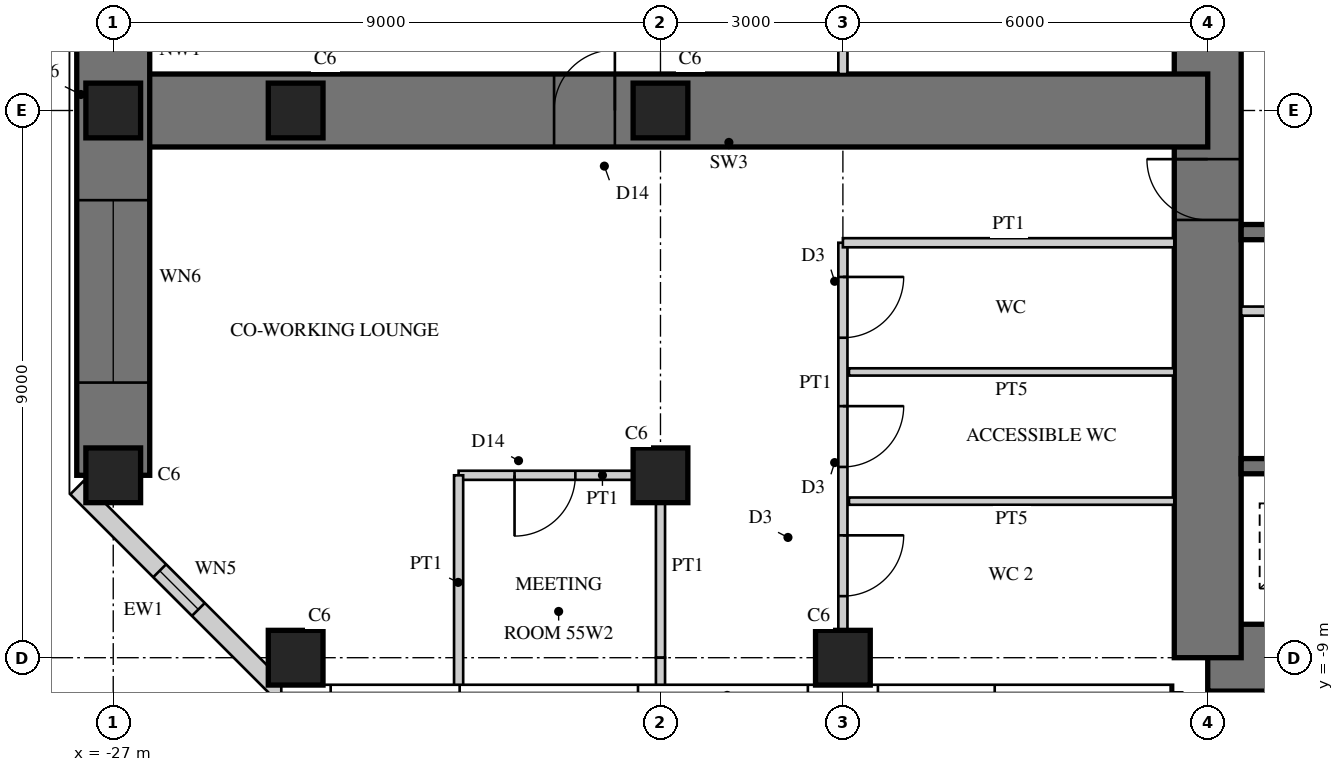
"""IFC4 building model, lengths in metres.
Left out: names, types, materials, properties, quantities, classifications, styles, units other than length and angle.
Written with IfcOpenShell. Run it as: python <this file> out.ifc"""

import sys

from ifc_helpers import new_model, si_unit, direction, frame, frame_2d, origin, origin_2d, place, context, subcontext, project, spatial, rectangle, hollow_rectangle, extrude, element, fill, save


model = new_model("IFC4")
c1 = context("Model", 3, precision=1e-05, world=origin(), true_north=direction((0.0, 1.0)))
c2 = subcontext(c1, "Body", "Model", "MODEL_VIEW")
j1 = project(units=[si_unit("LENGTHUNIT", "METRE"), si_unit("PLANEANGLEUNIT", "RADIAN")], contexts=[c1])
p1 = place(None, origin())
s1 = spatial("IfcSite", under=j1, at=p1, CompositionType="ELEMENT")
p2 = place(p1, origin())
s2 = spatial("IfcBuilding", under=s1, at=p2, CompositionType="ELEMENT")
p3 = place(p2, frame((0.0, 0.0, 217.1)))
s3 = spatial("IfcBuildingStorey", under=s2, at=p3, CompositionType="ELEMENT", Elevation=217.1)
p4 = place(p3, frame((-9.0, -9.0, 0.0), z_axis=(0.0, 0.0, 1.0), x_axis=(1.0, 0.0, 0.0)))
e1 = element("IfcWall", 1, at=p4, inside=s3, PredefinedType="SHEAR", context=c2, shape_type="SweptSolid", body=[
    extrude(rectangle(XDim=18.0, YDim=1.1, at=frame_2d((9.0, 0.0))), origin(), (0.0, 0.0, 1.0), 5.0),
])
p5 = place(p4, frame((9.8, 0.0, 0.0)))
e2 = element("IfcOpeningElement", 2, at=p5, cuts=e1, PredefinedType="OPENING", context=c2, shape_type="SweptSolid", body=[
    extrude(rectangle(XDim=1.0, YDim=2.4, at=frame_2d((0.5, 1.2))), frame((0.0, 0.56, 0.0), z_axis=(0.0, -1.0, 0.0), x_axis=(1.0, 0.0, 0.0)), (0.0, 0.0, 1.0), 1.12),
])
p6 = place(p3, frame((-9.0, 9.0, 0.0), z_axis=(0.0, 0.0, 1.0), x_axis=(0.0, -1.0, 0.0)))
e3 = element("IfcWall", 3, at=p6, inside=s3, PredefinedType="SHEAR", context=c2, shape_type="SweptSolid", body=[
    extrude(rectangle(XDim=18.0, YDim=1.1, at=frame_2d((9.0, 0.0))), origin(), (0.0, 0.0, 1.0), 5.0),
])
p7 = place(p6, frame((9.8, 0.0, 0.0)))
e4 = element("IfcOpeningElement", 4, at=p7, cuts=e3, PredefinedType="OPENING", context=c2, shape_type="SweptSolid", body=[
    extrude(rectangle(XDim=1.0, YDim=2.4, at=frame_2d((0.5, 1.2))), frame((0.0, 0.56, 0.0), z_axis=(0.0, -1.0, 0.0), x_axis=(1.0, 0.0, 0.0)), (0.0, 0.0, 1.0), 1.12),
])
p8 = place(p3, frame((-1.925, -2.0, 0.0), z_axis=(0.0, 0.0, 1.0), x_axis=(-1.0, 0.0, 0.0)))
e5 = element("IfcWall", 5, at=p8, inside=s3, PredefinedType="SHEAR", context=c2, shape_type="SweptSolid", body=[
    extrude(rectangle(XDim=6.525, YDim=0.25, at=frame_2d((3.262, 0.0))), origin(), (0.0, 0.0, 1.0), 5.0),
])
p9 = place(p3, frame((-1.925, -5.85, 0.0), z_axis=(0.0, 0.0, 1.0), x_axis=(-1.0, 0.0, 0.0)))
e6 = element("IfcWall", 6, at=p9, inside=s3, PredefinedType="SHEAR", context=c2, shape_type="SweptSolid", body=[
    extrude(rectangle(XDim=6.525, YDim=0.25, at=frame_2d((3.262, 0.0))), origin(), (0.0, 0.0, 1.0), 5.0),
])
p10 = place(p9, frame((0.471, 0.0, 0.0)))
e7 = element("IfcOpeningElement", 7, at=p10, cuts=e6, PredefinedType="OPENING", context=c2, shape_type="SweptSolid", body=[
    extrude(rectangle(XDim=1.1, YDim=2.2, at=frame_2d((0.55, 1.1))), frame((0.0, 0.135, 0.0), z_axis=(0.0, -1.0, 0.0), x_axis=(1.0, 0.0, 0.0)), (0.0, 0.0, 1.0), 0.27),
])
p11 = place(p9, frame((2.712, 0.0, 0.0)))
e8 = element("IfcOpeningElement", 8, at=p11, cuts=e6, PredefinedType="OPENING", context=c2, shape_type="SweptSolid", body=[
    extrude(rectangle(XDim=1.1, YDim=2.2, at=frame_2d((0.55, 1.1))), frame((0.0, 0.135, 0.0), z_axis=(0.0, -1.0, 0.0), x_axis=(1.0, 0.0, 0.0)), (0.0, 0.0, 1.0), 0.27),
])
p12 = place(p9, frame((4.954, 0.0, 0.0)))
e9 = element("IfcOpeningElement", 9, at=p12, cuts=e6, PredefinedType="OPENING", context=c2, shape_type="SweptSolid", body=[
    extrude(rectangle(XDim=1.1, YDim=2.2, at=frame_2d((0.55, 1.1))), frame((0.0, 0.135, 0.0), z_axis=(0.0, -1.0, 0.0), x_axis=(1.0, 0.0, 0.0)), (0.0, 0.0, 1.0), 0.27),
])
p13 = place(p3, frame((-1.925, -3.3, 0.0), z_axis=(0.0, 0.0, 1.0), x_axis=(-1.0, 0.0, 0.0)))
e10 = element("IfcWall", 10, at=p13, inside=s3, PredefinedType="PARTITIONING", context=c2, shape_type="SweptSolid", body=[
    extrude(rectangle(XDim=6.525, YDim=0.15, at=frame_2d((3.262, 0.0))), origin(), (0.0, 0.0, 1.0), 5.0),
])
p14 = place(p13, frame((0.075, 0.0, 0.0)))
e11 = element("IfcOpeningElement", 11, at=p14, cuts=e10, PredefinedType="OPENING", context=c2, shape_type="SweptSolid", body=[
    extrude(rectangle(XDim=0.8, YDim=2.1, at=frame_2d((0.4, 1.05))), frame((0.0, 0.085, 0.0), z_axis=(0.0, -1.0, 0.0), x_axis=(1.0, 0.0, 0.0)), (0.0, 0.0, 1.0), 0.17),
])
p15 = place(p13, frame((3.675, 0.0, 0.0)))
e12 = element("IfcOpeningElement", 12, at=p15, cuts=e10, PredefinedType="OPENING", context=c2, shape_type="SweptSolid", body=[
    extrude(rectangle(XDim=0.8, YDim=2.1, at=frame_2d((0.4, 1.05))), frame((0.0, 0.085, 0.0), z_axis=(0.0, -1.0, 0.0), x_axis=(1.0, 0.0, 0.0)), (0.0, 0.0, 1.0), 0.17),
])
p16 = place(p3, frame((-9.0, 0.0, 0.0), z_axis=(0.0, 0.0, 1.0), x_axis=(-1.0, 0.0, 0.0)))
e13 = element("IfcWall", 13, at=p16, inside=s3, PredefinedType="SHEAR", context=c2, shape_type="SweptSolid", body=[
    extrude(rectangle(XDim=18.0, YDim=1.2, at=frame_2d((9.0, 0.0))), origin(), (0.0, 0.0, 1.0), 5.0),
])
p17 = place(p16, frame((9.75, 0.0, 0.0)))
e14 = element("IfcOpeningElement", 14, at=p17, cuts=e13, PredefinedType="OPENING", context=c2, shape_type="SweptSolid", body=[
    extrude(rectangle(XDim=1.0, YDim=2.2, at=frame_2d((0.5, 1.1))), frame((0.0, 0.61, 0.0), z_axis=(0.0, -1.0, 0.0), x_axis=(1.0, 0.0, 0.0)), (0.0, 0.0, 1.0), 1.22),
])
p18 = place(p3, frame((-27.0, 6.0, 0.0), z_axis=(0.0, 0.0, 1.0), x_axis=(0.0, -1.0, 0.0)))
e15 = element("IfcWall", 15, at=p18, inside=s3, PredefinedType="SHEAR", context=c2, shape_type="SweptSolid", body=[
    extrude(rectangle(XDim=12.0, YDim=1.2, at=frame_2d((6.0, 0.0))), origin(), (0.0, 0.0, 1.0), 5.0),
])
p19 = place(p18, frame((1.525, 0.0, 0.6)))
e16 = element("IfcOpeningElement", 16, at=p19, cuts=e15, PredefinedType="OPENING", context=c2, shape_type="SweptSolid", body=[
    extrude(rectangle(XDim=3.0, YDim=2.4, at=frame_2d((1.5, 1.2))), frame((0.0, 0.61, 0.0), z_axis=(0.0, -1.0, 0.0), x_axis=(1.0, 0.0, 0.0)), (0.0, 0.0, 1.0), 1.22),
])
p20 = place(p18, frame((7.475, 0.0, 0.6)))
e17 = element("IfcOpeningElement", 17, at=p20, cuts=e15, PredefinedType="OPENING", context=c2, shape_type="SweptSolid", body=[
    extrude(rectangle(XDim=3.0, YDim=2.4, at=frame_2d((1.5, 1.2))), frame((0.0, 0.61, 0.0), z_axis=(0.0, -1.0, 0.0), x_axis=(1.0, 0.0, 0.0)), (0.0, 0.0, 1.0), 1.22),
])
for number, where, z_axis, x_axis in (
    (18, (-15.0, -9.0, 0.0), (0.0, 0.0, 1.0), (1.0, 0.0, 0.0)),
    (19, (-24.0, -9.0, 0.0), (0.0, 0.0, 1.0), (1.0, 0.0, 0.0)),
    (20, (-27.0, 0.0, 0.0), (0.0, 0.0, 1.0), (1.0, 0.0, 0.0)),
    (21, (-27.0, -6.0, 0.0), (0.0, 0.0, 1.0), (1.0, 0.0, 0.0)),
    (22, (-18.0, 0.0, 0.0), (0.0, 0.0, 1.0), (1.0, 0.0, 0.0)),
    (23, (-18.0, -6.0, 0.0), (0.0, 0.0, 1.0), (1.0, 0.0, 0.0)),
    (24, (-24.0, 0.0, 0.0), (0.0, 0.0, 1.0), (1.0, 0.0, 0.0)),
):
    element("IfcColumn", number, at=place(p3, frame(where, z_axis=z_axis, x_axis=x_axis)), inside=s3, PredefinedType="COLUMN", context=c2, shape_type="SweptSolid", body=[
        extrude(rectangle(XDim=0.9, YDim=0.9, at=origin_2d()), origin(), (0.0, 0.0, 1.0), 5.0),
    ])
p21 = place(p3, frame((-27.6, -6.206, 0.0), z_axis=(0.0, 0.0, 1.0), x_axis=(0.707106781187, -0.707106781187, 0.0)))
e25 = element("IfcWall", 25, at=p21, inside=s3, PredefinedType="SOLIDWALL", context=c2, shape_type="SweptSolid", body=[
    extrude(rectangle(XDim=4.757, YDim=0.3, at=frame_2d((2.379, 0.0))), origin(), (0.0, 0.0, 1.0), 4.82),
])
p22 = place(p21, frame((1.929, 0.0, 0.3)))
e26 = element("IfcOpeningElement", 26, at=p22, cuts=e25, PredefinedType="OPENING", context=c2, shape_type="SweptSolid", body=[
    extrude(rectangle(XDim=0.9, YDim=2.4, at=frame_2d((0.45, 1.2))), frame((0.0, 0.16, 0.0), z_axis=(0.0, -1.0, 0.0), x_axis=(1.0, 0.0, 0.0)), (0.0, 0.0, 1.0), 0.32),
])
p23 = place(p3, frame((-15.0, -2.175, 0.0), z_axis=(0.0, 0.0, 1.0), x_axis=(0.0, -1.0, 0.0)))
e27 = element("IfcWall", 27, at=p23, inside=s3, PredefinedType="PARTITIONING", context=c2, shape_type="SweptSolid", body=[
    extrude(rectangle(XDim=6.375, YDim=0.15, at=frame_2d((3.188, 0.0))), origin(), (0.0, 0.0, 1.0), 4.07),
])
p24 = place(p23, frame((0.562, 0.0, 0.0)))
e28 = element("IfcOpeningElement", 28, at=p24, cuts=e27, PredefinedType="OPENING", context=c2, shape_type="SweptSolid", body=[
    extrude(rectangle(XDim=1.0, YDim=2.1, at=frame_2d((0.5, 1.05))), frame((0.0, 0.085, 0.0), z_axis=(0.0, -1.0, 0.0), x_axis=(1.0, 0.0, 0.0)), (0.0, 0.0, 1.0), 0.17),
])
p25 = place(p23, frame((2.688, 0.0, 0.0)))
e29 = element("IfcOpeningElement", 29, at=p25, cuts=e27, PredefinedType="OPENING", context=c2, shape_type="SweptSolid", body=[
    extrude(rectangle(XDim=1.0, YDim=2.1, at=frame_2d((0.5, 1.05))), frame((0.0, 0.085, 0.0), z_axis=(0.0, -1.0, 0.0), x_axis=(1.0, 0.0, 0.0)), (0.0, 0.0, 1.0), 0.17),
])
p26 = place(p23, frame((4.812, 0.0, 0.0)))
e30 = element("IfcOpeningElement", 30, at=p26, cuts=e27, PredefinedType="OPENING", context=c2, shape_type="SweptSolid", body=[
    extrude(rectangle(XDim=1.0, YDim=2.1, at=frame_2d((0.5, 1.05))), frame((0.0, 0.085, 0.0), z_axis=(0.0, -1.0, 0.0), x_axis=(1.0, 0.0, 0.0)), (0.0, 0.0, 1.0), 0.17),
])
p27 = place(p3, frame((-9.55, -2.175, 0.0), z_axis=(0.0, 0.0, 1.0), x_axis=(-1.0, 0.0, 0.0)))
e31 = element("IfcWall", 31, at=p27, inside=s3, PredefinedType="PARTITIONING", context=c2, shape_type="SweptSolid", body=[
    extrude(rectangle(XDim=5.45, YDim=0.15, at=frame_2d((2.725, 0.0))), origin(), (0.0, 0.0, 1.0), 4.82),
])
for number, where, z_axis, x_axis in (
    (32, (-9.55, -4.3, 0.0), (0.0, 0.0, 1.0), (-1.0, 0.0, 0.0)),
    (33, (-9.55, -6.425, 0.0), (0.0, 0.0, 1.0), (-1.0, 0.0, 0.0)),
):
    element("IfcWall", number, at=place(p3, frame(where, z_axis=z_axis, x_axis=x_axis)), inside=s3, PredefinedType="PLUMBINGWALL", context=c2, shape_type="SweptSolid", body=[
        extrude(rectangle(XDim=5.35, YDim=0.12, at=frame_2d((2.675, 0.0))), origin(), (0.0, 0.0, 1.0), 4.82),
    ])
p28 = place(p3, frame((-15.0, 8.55, 0.0), z_axis=(0.0, 0.0, 1.0), x_axis=(0.0, -1.0, 0.0)))
e34 = element("IfcWall", 34, at=p28, inside=s3, PredefinedType="PARTITIONING", context=c2, shape_type="SweptSolid", body=[
    extrude(rectangle(XDim=7.95, YDim=0.15, at=frame_2d((3.975, 0.0))), origin(), (0.0, 0.0, 1.0), 4.07),
])
p29 = place(p28, frame((1.462, 0.0, 0.0)))
e35 = element("IfcOpeningElement", 35, at=p29, cuts=e34, PredefinedType="OPENING", context=c2, shape_type="SweptSolid", body=[
    extrude(rectangle(XDim=1.0, YDim=2.1, at=frame_2d((0.5, 1.05))), frame((0.0, 0.085, 0.0), z_axis=(0.0, -1.0, 0.0), x_axis=(1.0, 0.0, 0.0)), (0.0, 0.0, 1.0), 0.17),
])
p30 = place(p28, frame((5.438, 0.0, 0.0)))
e36 = element("IfcOpeningElement", 36, at=p30, cuts=e34, PredefinedType="OPENING", context=c2, shape_type="SweptSolid", body=[
    extrude(rectangle(XDim=1.0, YDim=2.1, at=frame_2d((0.5, 1.05))), frame((0.0, 0.085, 0.0), z_axis=(0.0, -1.0, 0.0), x_axis=(1.0, 0.0, 0.0)), (0.0, 0.0, 1.0), 0.17),
])
p31 = place(p3, frame((-18.0, -6.0, 0.0), z_axis=(0.0, 0.0, 1.0), x_axis=(-1.0, 0.0, 0.0)))
e37 = element("IfcWall", 37, at=p31, inside=s3, PredefinedType="PARTITIONING", context=c2, shape_type="SweptSolid", body=[
    extrude(rectangle(XDim=3.32, YDim=0.15, at=frame_2d((1.66, 0.0))), origin(), (0.0, 0.0, 1.0), 4.17),
])
p32 = place(p31, frame((1.4, 0.0, 0.0)))
e38 = element("IfcOpeningElement", 38, at=p32, cuts=e37, PredefinedType="OPENING", context=c2, shape_type="SweptSolid", body=[
    extrude(rectangle(XDim=1.0, YDim=2.2, at=frame_2d((0.5, 1.1))), frame((0.0, 0.085, 0.0), z_axis=(0.0, -1.0, 0.0), x_axis=(1.0, 0.0, 0.0)), (0.0, 0.0, 1.0), 0.17),
])
p33 = place(p3, frame((-18.0, -6.0, 0.0), z_axis=(0.0, 0.0, 1.0), x_axis=(0.0, -1.0, 0.0)))
e39 = element("IfcWall", 39, at=p33, inside=s3, PredefinedType="PARTITIONING", context=c2, shape_type="SweptSolid", body=[
    extrude(rectangle(XDim=3.0, YDim=0.15, at=frame_2d((1.5, 0.0))), origin(), (0.0, 0.0, 1.0), 4.07),
])
p34 = place(p3, frame((-18.0, -9.0, 0.0), z_axis=(0.0, 0.0, 1.0), x_axis=(0.0, -1.0, 0.0)))
e40 = element("IfcWall", 40, at=p34, inside=s3, PredefinedType="PARTITIONING", context=c2, shape_type="SweptSolid", body=[
    extrude(rectangle(XDim=0.53, YDim=0.15, at=frame_2d((0.265, 0.0))), origin(), (0.0, 0.0, 1.0), 4.82),
])
p35 = place(p3, frame((-21.32, -6.0, 0.0), z_axis=(0.0, 0.0, 1.0), x_axis=(0.0, -1.0, 0.0)))
e41 = element("IfcWall", 41, at=p35, inside=s3, PredefinedType="PARTITIONING", context=c2, shape_type="SweptSolid", body=[
    extrude(rectangle(XDim=3.53, YDim=0.15, at=frame_2d((1.765, 0.0))), origin(), (0.0, 0.0, 1.0), 4.82),
])
p36 = place(p20, origin())
e42 = element("IfcWindow", 42, at=p36, inside=s3, PartitioningType="SINGLE_PANEL", PredefinedType="WINDOW", context=c2, shape_type="SweptSolid", body=[
    extrude(hollow_rectangle(XDim=3.0, YDim=2.4, WallThickness=0.06, at=frame_2d((1.5, 1.2))), frame((0.0, 0.03, 0.0), z_axis=(0.0, -1.0, 0.0), x_axis=(1.0, 0.0, 0.0)), (0.0, 0.0, 1.0), 0.06),
    extrude(rectangle(XDim=2.879, YDim=2.279, at=frame_2d((1.5, 1.2))), frame((0.0, 0.03, 0.0), z_axis=(0.0, -1.0, 0.0), x_axis=(1.0, 0.0, 0.0)), (0.0, 0.0, 1.0), 0.06),
])
fill(e17, e42)
p37 = place(p22, origin())
e43 = element("IfcWindow", 43, at=p37, inside=s3, PartitioningType="SINGLE_PANEL", PredefinedType="WINDOW", context=c2, shape_type="SweptSolid", body=[
    extrude(hollow_rectangle(XDim=0.9, YDim=2.4, WallThickness=0.06, at=frame_2d((0.45, 1.2))), frame((0.0, 0.03, 0.0), z_axis=(0.0, -1.0, 0.0), x_axis=(1.0, 0.0, 0.0)), (0.0, 0.0, 1.0), 0.06),
    extrude(rectangle(XDim=0.779, YDim=2.279, at=frame_2d((0.45, 1.2))), frame((0.0, 0.03, 0.0), z_axis=(0.0, -1.0, 0.0), x_axis=(1.0, 0.0, 0.0)), (0.0, 0.0, 1.0), 0.06),
])
fill(e26, e43)
p38 = place(p24, origin())
e44 = element("IfcDoor", 44, at=p38, inside=s3, OperationType="SINGLE_SWING_LEFT", PredefinedType="DOOR", context=c2, shape_type="SweptSolid", body=[
    extrude(rectangle(XDim=1.0, YDim=2.1, at=frame_2d((0.5, 1.05))), frame((0.0, 0.025, 0.0), z_axis=(0.0, -1.0, 0.0), x_axis=(1.0, 0.0, 0.0)), (0.0, 0.0, 1.0), 0.05),
])
fill(e28, e44)
p39 = place(p25, origin())
e45 = element("IfcDoor", 45, at=p39, inside=s3, OperationType="SINGLE_SWING_LEFT", PredefinedType="DOOR", context=c2, shape_type="SweptSolid", body=[
    extrude(rectangle(XDim=1.0, YDim=2.1, at=frame_2d((0.5, 1.05))), frame((0.0, 0.025, 0.0), z_axis=(0.0, -1.0, 0.0), x_axis=(1.0, 0.0, 0.0)), (0.0, 0.0, 1.0), 0.05),
])
fill(e29, e45)
p40 = place(p26, origin())
e46 = element("IfcDoor", 46, at=p40, inside=s3, OperationType="SINGLE_SWING_LEFT", PredefinedType="DOOR", context=c2, shape_type="SweptSolid", body=[
    extrude(rectangle(XDim=1.0, YDim=2.1, at=frame_2d((0.5, 1.05))), frame((0.0, 0.025, 0.0), z_axis=(0.0, -1.0, 0.0), x_axis=(1.0, 0.0, 0.0)), (0.0, 0.0, 1.0), 0.05),
])
fill(e30, e46)
p41 = place(p32, origin())
e47 = element("IfcDoor", 47, at=p41, inside=s3, OperationType="SINGLE_SWING_RIGHT", PredefinedType="DOOR", context=c2, shape_type="SweptSolid", body=[
    extrude(rectangle(XDim=1.0, YDim=2.2, at=frame_2d((0.5, 1.1))), frame((0.0, 0.025, 0.0), z_axis=(0.0, -1.0, 0.0), x_axis=(1.0, 0.0, 0.0)), (0.0, 0.0, 1.0), 0.05),
])
fill(e38, e47)
p42 = place(p17, frame((1.0, 0.0, 0.0), z_axis=(0.0, 0.0, 1.0), x_axis=(-1.0, 0.0, 0.0)))
e48 = element("IfcDoor", 48, at=p42, inside=s3, OperationType="SINGLE_SWING_RIGHT", PredefinedType="DOOR", context=c2, shape_type="SweptSolid", body=[
    extrude(rectangle(XDim=1.0, YDim=2.2, at=frame_2d((0.5, 1.1))), frame((0.0, 0.025, 0.0), z_axis=(0.0, -1.0, 0.0), x_axis=(1.0, 0.0, 0.0)), (0.0, 0.0, 1.0), 0.05),
])
fill(e14, e48)
p43 = place(p7, frame((1.0, 0.0, 0.0), z_axis=(0.0, 0.0, 1.0), x_axis=(-1.0, 0.0, 0.0)))
e49 = element("IfcDoor", 49, at=p43, inside=s3, OperationType="SINGLE_SWING_RIGHT", PredefinedType="DOOR", context=c2, shape_type="SweptSolid", body=[
    extrude(rectangle(XDim=1.0, YDim=2.4, at=frame_2d((0.5, 1.2))), frame((0.0, -0.005, 0.0), z_axis=(0.0, -1.0, 0.0), x_axis=(1.0, 0.0, 0.0)), (0.0, 0.0, 1.0), 0.05),
])
fill(e4, e49)
save(model, sys.argv[1])
